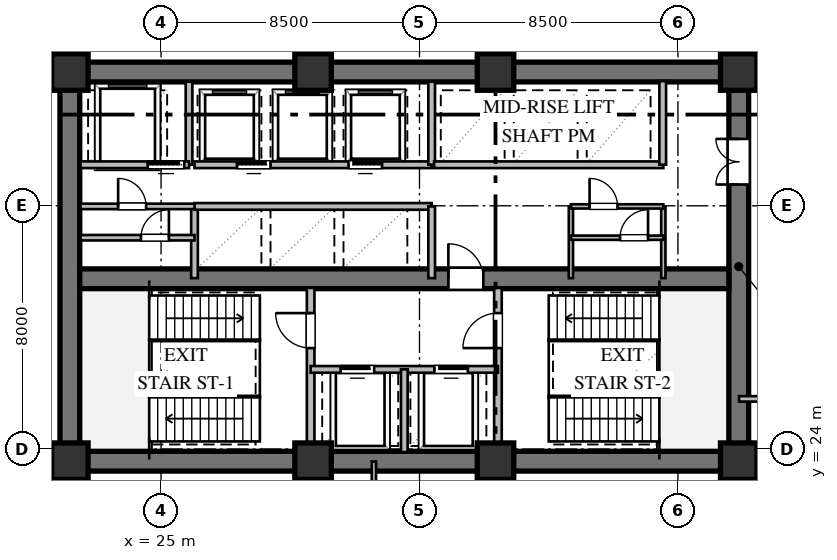
"""IFC4 building model, lengths in metres.
Left out: names, types, materials, properties, quantities, classifications, styles, units other than length and angle.
Written with IfcOpenShell. Run it as: python <this file> out.ifc"""

import sys

from ifc_helpers import new_model, si_unit, direction, frame, frame_2d, origin, origin_2d, place, context, subcontext, project, spatial, rectangle, extrude, element, fill, save


model = new_model("IFC4")
c1 = context("Model", 3, precision=1e-05, world=origin(), true_north=direction((0.0, 1.0)))
c2 = subcontext(c1, "Body", "Model", "MODEL_VIEW")
j1 = project(units=[si_unit("LENGTHUNIT", "METRE"), si_unit("PLANEANGLEUNIT", "RADIAN")], contexts=[c1])
p1 = place(None, origin())
s1 = spatial("IfcSite", under=j1, at=p1, CompositionType="ELEMENT")
p2 = place(p1, origin())
s2 = spatial("IfcBuilding", under=s1, at=p2, CompositionType="ELEMENT")
p3 = place(p2, frame((0.0, 0.0, 19.2)))
s3 = spatial("IfcBuildingStorey", under=s2, at=p3, CompositionType="ELEMENT", Elevation=19.2)
for number, where, z_axis, x_axis in (
    (1, (21.675, 23.6, 0.0), (0.0, 0.0, 1.0), (1.0, 0.0, 0.0)),
    (2, (21.675, 36.4, 0.0), (0.0, 0.0, 1.0), (1.0, 0.0, 0.0)),
):
    element("IfcWall", number, at=place(p3, frame(where, z_axis=z_axis, x_axis=x_axis)), inside=s3, PredefinedType="SHEAR", context=c2, shape_type="SweptSolid", body=[
        extrude(rectangle(XDim=22.65, YDim=0.65, at=frame_2d((11.325, 0.0))), origin(), (0.0, 0.0, 1.0), 4.56),
    ])
p4 = place(p3, frame((22.0, 23.925, 0.0), z_axis=(0.0, 0.0, 1.0), x_axis=(0.0, 1.0, 0.0)))
e3 = element("IfcWall", 3, at=p4, inside=s3, PredefinedType="SHEAR", context=c2, shape_type="SweptSolid", body=[
    extrude(rectangle(XDim=12.15, YDim=0.65, at=frame_2d((6.075, 0.0))), origin(), (0.0, 0.0, 1.0), 4.56),
])
p5 = place(p3, frame((44.0, 23.925, 0.0), z_axis=(0.0, 0.0, 1.0), x_axis=(0.0, 1.0, 0.0)))
e4 = element("IfcWall", 4, at=p5, inside=s3, PredefinedType="SHEAR", context=c2, shape_type="SweptSolid", body=[
    extrude(rectangle(XDim=12.15, YDim=0.65, at=frame_2d((6.075, 0.0))), origin(), (0.0, 0.0, 1.0), 4.56),
])
p6 = place(p5, frame((8.775, 0.0, 0.0)))
e5 = element("IfcOpeningElement", 5, at=p6, cuts=e4, PredefinedType="OPENING", context=c2, shape_type="SweptSolid", body=[
    extrude(rectangle(XDim=1.5, YDim=2.15, at=frame_2d((0.75, 1.075))), frame((0.0, 0.335, 0.0), z_axis=(0.0, -1.0, 0.0), x_axis=(1.0, 0.0, 0.0)), (0.0, 0.0, 1.0), 0.67),
])
p7 = place(p3, frame((22.325, 29.6, 0.0), z_axis=(0.0, 0.0, 1.0), x_axis=(1.0, 0.0, 0.0)))
e6 = element("IfcWall", 6, at=p7, inside=s3, PredefinedType="SHEAR", context=c2, shape_type="SweptSolid", body=[
    extrude(rectangle(XDim=21.35, YDim=0.65, at=frame_2d((10.675, 0.0))), origin(), (0.0, 0.0, 1.0), 4.56),
])
p8 = place(p7, frame((12.125, 0.0, 0.0)))
e7 = element("IfcOpeningElement", 7, at=p8, cuts=e6, PredefinedType="OPENING", context=c2, shape_type="SweptSolid", body=[
    extrude(rectangle(XDim=1.15, YDim=2.1, at=frame_2d((0.575, 1.05))), frame((0.0, 0.335, 0.0), z_axis=(0.0, -1.0, 0.0), x_axis=(1.0, 0.0, 0.0)), (0.0, 0.0, 1.0), 0.67),
])
for number, where, z_axis, x_axis in (
    (8, (22.0, 23.6, 0.0), (0.0, 0.0, 1.0), (1.0, 0.0, 0.0)),
    (9, (30.0, 23.6, 0.0), (0.0, 0.0, 1.0), (1.0, 0.0, 0.0)),
    (10, (36.0, 23.6, 0.0), (0.0, 0.0, 1.0), (1.0, 0.0, 0.0)),
    (11, (44.0, 23.6, 0.0), (0.0, 0.0, 1.0), (1.0, 0.0, 0.0)),
    (12, (44.0, 36.4, 0.0), (0.0, 0.0, 1.0), (1.0, 0.0, 0.0)),
    (13, (36.0, 36.4, 0.0), (0.0, 0.0, 1.0), (1.0, 0.0, 0.0)),
    (14, (30.0, 36.4, 0.0), (0.0, 0.0, 1.0), (1.0, 0.0, 0.0)),
    (15, (22.0, 36.4, 0.0), (0.0, 0.0, 1.0), (1.0, 0.0, 0.0)),
):
    element("IfcColumn", number, at=place(p3, frame(where, z_axis=z_axis, x_axis=x_axis)), inside=s3, PredefinedType="COLUMN", context=c2, shape_type="SweptSolid", body=[
        extrude(rectangle(XDim=1.2, YDim=1.2, at=origin_2d()), origin(), (0.0, 0.0, 1.0), 4.8),
    ])
p9 = place(p3, frame((29.92, 23.9, 0.0), z_axis=(0.0, 0.0, 1.0), x_axis=(0.0, 1.0, 0.0)))
e16 = element("IfcWall", 16, at=p9, inside=s3, PredefinedType="SOLIDWALL", context=c2, shape_type="SweptSolid", body=[
    extrude(rectangle(XDim=5.4, YDim=0.25, at=frame_2d((2.7, 0.0))), origin(), (0.0, 0.0, 1.0), 4.56),
])
p10 = place(p9, frame((3.421, 0.0, 0.0)))
e17 = element("IfcOpeningElement", 17, at=p10, cuts=e16, PredefinedType="OPENING", context=c2, shape_type="SweptSolid", body=[
    extrude(rectangle(XDim=1.15, YDim=2.1, at=frame_2d((0.575, 1.05))), frame((0.0, 0.135, 0.0), z_axis=(0.0, -1.0, 0.0), x_axis=(1.0, 0.0, 0.0)), (0.0, 0.0, 1.0), 0.27),
])
p11 = place(p3, frame((36.08, 23.9, 0.0), z_axis=(0.0, 0.0, 1.0), x_axis=(0.0, 1.0, 0.0)))
e18 = element("IfcWall", 18, at=p11, inside=s3, PredefinedType="SOLIDWALL", context=c2, shape_type="SweptSolid", body=[
    extrude(rectangle(XDim=5.4, YDim=0.25, at=frame_2d((2.7, 0.0))), origin(), (0.0, 0.0, 1.0), 4.56),
])
p12 = place(p11, frame((3.421, 0.0, 0.0)))
e19 = element("IfcOpeningElement", 19, at=p12, cuts=e18, PredefinedType="OPENING", context=c2, shape_type="SweptSolid", body=[
    extrude(rectangle(XDim=1.15, YDim=2.1, at=frame_2d((0.575, 1.05))), frame((0.0, 0.135, 0.0), z_axis=(0.0, -1.0, 0.0), x_axis=(1.0, 0.0, 0.0)), (0.0, 0.0, 1.0), 0.27),
])
p13 = place(p3, frame((29.92, 26.62, 0.0), z_axis=(0.0, 0.0, 1.0), x_axis=(1.0, 0.0, 0.0)))
e20 = element("IfcWall", 20, at=p13, inside=s3, PredefinedType="SOLIDWALL", context=c2, shape_type="SweptSolid", body=[
    extrude(rectangle(XDim=6.16, YDim=0.22, at=frame_2d((3.08, 0.0))), origin(), (0.0, 0.0, 1.0), 4.56),
])
p14 = place(p13, frame((0.99, 0.0, 0.0)))
e21 = element("IfcOpeningElement", 21, at=p14, cuts=e20, PredefinedType="OPENING", context=c2, shape_type="SweptSolid", body=[
    extrude(rectangle(XDim=1.1, YDim=2.1, at=frame_2d((0.55, 1.05))), frame((0.0, 0.12, 0.0), z_axis=(0.0, -1.0, 0.0), x_axis=(1.0, 0.0, 0.0)), (0.0, 0.0, 1.0), 0.24),
])
p15 = place(p13, frame((4.07, 0.0, 0.0)))
e22 = element("IfcOpeningElement", 22, at=p15, cuts=e20, PredefinedType="OPENING", context=c2, shape_type="SweptSolid", body=[
    extrude(rectangle(XDim=1.1, YDim=2.1, at=frame_2d((0.55, 1.05))), frame((0.0, 0.12, 0.0), z_axis=(0.0, -1.0, 0.0), x_axis=(1.0, 0.0, 0.0)), (0.0, 0.0, 1.0), 0.24),
])
p16 = place(p3, frame((33.0, 23.9, 0.0), z_axis=(0.0, 0.0, 1.0), x_axis=(0.0, 1.0, 0.0)))
e23 = element("IfcWall", 23, at=p16, inside=s3, PredefinedType="SOLIDWALL", context=c2, shape_type="SweptSolid", body=[
    extrude(rectangle(XDim=2.72, YDim=0.22, at=frame_2d((1.36, 0.0))), origin(), (0.0, 0.0, 1.0), 4.56),
])
p17 = place(p3, frame((25.92, 33.35, 0.0), z_axis=(0.0, 0.0, 1.0), x_axis=(0.0, 1.0, 0.0)))
e24 = element("IfcWall", 24, at=p17, inside=s3, PredefinedType="SOLIDWALL", context=c2, shape_type="SweptSolid", body=[
    extrude(rectangle(XDim=2.73, YDim=0.22, at=frame_2d((1.365, 0.0))), origin(), (0.0, 0.0, 1.0), 4.56),
])
p18 = place(p3, frame((22.35, 33.35, 0.0), z_axis=(0.0, 0.0, 1.0), x_axis=(1.0, 0.0, 0.0)))
e25 = element("IfcWall", 25, at=p18, inside=s3, PredefinedType="SOLIDWALL", context=c2, shape_type="SweptSolid", body=[
    extrude(rectangle(XDim=3.57, YDim=0.22, at=frame_2d((1.785, 0.0))), origin(), (0.0, 0.0, 1.0), 4.56),
])
p19 = place(p18, frame((2.213, 0.0, 0.0)))
e26 = element("IfcOpeningElement", 26, at=p19, cuts=e25, PredefinedType="OPENING", context=c2, shape_type="SweptSolid", body=[
    extrude(rectangle(XDim=1.2, YDim=2.1, at=frame_2d((0.6, 1.05))), frame((0.0, 0.12, 0.0), z_axis=(0.0, -1.0, 0.0), x_axis=(1.0, 0.0, 0.0)), (0.0, 0.0, 1.0), 0.24),
])
p20 = place(p3, frame((26.1, 29.62, 0.0), z_axis=(0.0, 0.0, 1.0), x_axis=(0.0, 1.0, 0.0)))
e27 = element("IfcWall", 27, at=p20, inside=s3, PredefinedType="SOLIDWALL", context=c2, shape_type="SweptSolid", body=[
    extrude(rectangle(XDim=2.36, YDim=0.22, at=frame_2d((1.18, 0.0))), origin(), (0.0, 0.0, 1.0), 4.56),
])
p21 = place(p3, frame((26.1, 31.98, 0.0), z_axis=(0.0, 0.0, 1.0), x_axis=(1.0, 0.0, 0.0)))
e28 = element("IfcWall", 28, at=p21, inside=s3, PredefinedType="SOLIDWALL", context=c2, shape_type="SweptSolid", body=[
    extrude(rectangle(XDim=7.8, YDim=0.22, at=frame_2d((3.9, 0.0))), origin(), (0.0, 0.0, 1.0), 4.56),
])
p22 = place(p3, frame((33.9, 29.62, 0.0), z_axis=(0.0, 0.0, 1.0), x_axis=(0.0, 1.0, 0.0)))
e29 = element("IfcWall", 29, at=p22, inside=s3, PredefinedType="SOLIDWALL", context=c2, shape_type="SweptSolid", body=[
    extrude(rectangle(XDim=2.36, YDim=0.22, at=frame_2d((1.18, 0.0))), origin(), (0.0, 0.0, 1.0), 4.56),
])
p23 = place(p3, frame((26.1, 33.35, 0.0), z_axis=(0.0, 0.0, 1.0), x_axis=(1.0, 0.0, 0.0)))
e30 = element("IfcWall", 30, at=p23, inside=s3, PredefinedType="SOLIDWALL", context=c2, shape_type="SweptSolid", body=[
    extrude(rectangle(XDim=7.8, YDim=0.22, at=frame_2d((3.9, 0.0))), origin(), (0.0, 0.0, 1.0), 4.56),
])
p24 = place(p23, frame((1.4, 0.0, 0.0)))
e31 = element("IfcOpeningElement", 31, at=p24, cuts=e30, PredefinedType="OPENING", context=c2, shape_type="SweptSolid", body=[
    extrude(rectangle(XDim=1.1, YDim=2.1, at=frame_2d((0.55, 1.05))), frame((0.0, 0.12, 0.0), z_axis=(0.0, -1.0, 0.0), x_axis=(1.0, 0.0, 0.0)), (0.0, 0.0, 1.0), 0.24),
])
p25 = place(p23, frame((5.066, 0.0, 0.0)))
e32 = element("IfcOpeningElement", 32, at=p25, cuts=e30, PredefinedType="OPENING", context=c2, shape_type="SweptSolid", body=[
    extrude(rectangle(XDim=1.1, YDim=2.1, at=frame_2d((0.55, 1.05))), frame((0.0, 0.12, 0.0), z_axis=(0.0, -1.0, 0.0), x_axis=(1.0, 0.0, 0.0)), (0.0, 0.0, 1.0), 0.24),
])
p26 = place(p3, frame((33.9, 33.35, 0.0), z_axis=(0.0, 0.0, 1.0), x_axis=(0.0, 1.0, 0.0)))
e33 = element("IfcWall", 33, at=p26, inside=s3, PredefinedType="SOLIDWALL", context=c2, shape_type="SweptSolid", body=[
    extrude(rectangle(XDim=2.73, YDim=0.22, at=frame_2d((1.365, 0.0))), origin(), (0.0, 0.0, 1.0), 4.56),
])
p27 = place(p3, frame((33.98, 33.35, 0.0), z_axis=(0.0, 0.0, 1.0), x_axis=(1.0, 0.0, 0.0)))
e34 = element("IfcWall", 34, at=p27, inside=s3, PredefinedType="SOLIDWALL", context=c2, shape_type="SweptSolid", body=[
    extrude(rectangle(XDim=7.54, YDim=0.22, at=frame_2d((3.77, 0.0))), origin(), (0.0, 0.0, 1.0), 4.56),
])
p28 = place(p3, frame((41.5, 33.35, 0.0), z_axis=(0.0, 0.0, 1.0), x_axis=(0.0, 1.0, 0.0)))
e35 = element("IfcWall", 35, at=p28, inside=s3, PredefinedType="SOLIDWALL", context=c2, shape_type="SweptSolid", body=[
    extrude(rectangle(XDim=2.75, YDim=0.22, at=frame_2d((1.375, 0.0))), origin(), (0.0, 0.0, 1.0), 4.56),
])
p29 = place(p3, frame((22.35, 30.95, 0.0), z_axis=(0.0, 0.0, 1.0), x_axis=(1.0, 0.0, 0.0)))
e36 = element("IfcWall", 36, at=p29, inside=s3, PredefinedType="PARTITIONING", context=c2, shape_type="SweptSolid", body=[
    extrude(rectangle(XDim=3.75, YDim=0.18, at=frame_2d((1.875, 0.0))), origin(), (0.0, 0.0, 1.0), 4.56),
])
p30 = place(p29, frame((1.988, 0.0, 0.0)))
e37 = element("IfcOpeningElement", 37, at=p30, cuts=e36, PredefinedType="OPENING", context=c2, shape_type="SweptSolid", body=[
    extrude(rectangle(XDim=0.92, YDim=2.1, at=frame_2d((0.46, 1.05))), frame((0.0, 0.1, 0.0), z_axis=(0.0, -1.0, 0.0), x_axis=(1.0, 0.0, 0.0)), (0.0, 0.0, 1.0), 0.2),
])
p31 = place(p3, frame((22.35, 31.98, 0.0), z_axis=(0.0, 0.0, 1.0), x_axis=(1.0, 0.0, 0.0)))
e38 = element("IfcWall", 38, at=p31, inside=s3, PredefinedType="PARTITIONING", context=c2, shape_type="SweptSolid", body=[
    extrude(rectangle(XDim=3.75, YDim=0.18, at=frame_2d((1.875, 0.0))), origin(), (0.0, 0.0, 1.0), 4.56),
])
p32 = place(p31, frame((1.238, 0.0, 0.0)))
e39 = element("IfcOpeningElement", 39, at=p32, cuts=e38, PredefinedType="OPENING", context=c2, shape_type="SweptSolid", body=[
    extrude(rectangle(XDim=0.92, YDim=2.1, at=frame_2d((0.46, 1.05))), frame((0.0, 0.1, 0.0), z_axis=(0.0, -1.0, 0.0), x_axis=(1.0, 0.0, 0.0)), (0.0, 0.0, 1.0), 0.2),
])
p33 = place(p3, frame((38.48, 29.62, 0.0), z_axis=(0.0, 0.0, 1.0), x_axis=(0.0, 1.0, 0.0)))
e40 = element("IfcWall", 40, at=p33, inside=s3, PredefinedType="PARTITIONING", context=c2, shape_type="SweptSolid", body=[
    extrude(rectangle(XDim=2.36, YDim=0.14, at=frame_2d((1.18, 0.0))), origin(), (0.0, 0.0, 1.0), 4.56),
])
p34 = place(p3, frame((41.52, 29.62, 0.0), z_axis=(0.0, 0.0, 1.0), x_axis=(0.0, 1.0, 0.0)))
e41 = element("IfcWall", 41, at=p34, inside=s3, PredefinedType="PARTITIONING", context=c2, shape_type="SweptSolid", body=[
    extrude(rectangle(XDim=2.36, YDim=0.14, at=frame_2d((1.18, 0.0))), origin(), (0.0, 0.0, 1.0), 1.887),
])
p35 = place(p3, frame((38.48, 30.95, 0.0), z_axis=(0.0, 0.0, 1.0), x_axis=(1.0, 0.0, 0.0)))
e42 = element("IfcWall", 42, at=p35, inside=s3, PredefinedType="PARTITIONING", context=c2, shape_type="SweptSolid", body=[
    extrude(rectangle(XDim=3.04, YDim=0.14, at=frame_2d((1.52, 0.0))), origin(), (0.0, 0.0, 1.0), 4.56),
])
p36 = place(p35, frame((1.617, 0.0, 0.0)))
e43 = element("IfcOpeningElement", 43, at=p36, cuts=e42, PredefinedType="OPENING", context=c2, shape_type="SweptSolid", body=[
    extrude(rectangle(XDim=0.92, YDim=2.1, at=frame_2d((0.46, 1.05))), frame((0.0, 0.08, 0.0), z_axis=(0.0, -1.0, 0.0), x_axis=(1.0, 0.0, 0.0)), (0.0, 0.0, 1.0), 0.16),
])
p37 = place(p3, frame((38.48, 31.98, 0.0), z_axis=(0.0, 0.0, 1.0), x_axis=(1.0, 0.0, 0.0)))
e44 = element("IfcWall", 44, at=p37, inside=s3, PredefinedType="PARTITIONING", context=c2, shape_type="SweptSolid", body=[
    extrude(rectangle(XDim=3.04, YDim=0.14, at=frame_2d((1.52, 0.0))), origin(), (0.0, 0.0, 1.0), 4.56),
])
p38 = place(p37, frame((0.614, 0.0, 0.0)))
e45 = element("IfcOpeningElement", 45, at=p38, cuts=e44, PredefinedType="OPENING", context=c2, shape_type="SweptSolid", body=[
    extrude(rectangle(XDim=0.92, YDim=2.1, at=frame_2d((0.46, 1.05))), frame((0.0, 0.08, 0.0), z_axis=(0.0, -1.0, 0.0), x_axis=(1.0, 0.0, 0.0)), (0.0, 0.0, 1.0), 0.16),
])
p39 = place(p3, frame((62.415, 25.65, 0.0), z_axis=(0.0, 0.0, 1.0), x_axis=(-1.0, 0.0, 0.0)))
e46 = element("IfcWall", 46, at=p39, inside=s3, PredefinedType="PARTITIONING", context=c2, shape_type="SweptSolid", body=[
    extrude(rectangle(XDim=18.405, YDim=0.18, at=frame_2d((9.203, 0.0))), origin(), (0.0, 0.0, 1.0), 4.006),
])
p40 = place(p39, frame((8.46, 0.0, 0.0)))
e47 = element("IfcOpeningElement", 47, at=p40, cuts=e46, PredefinedType="OPENING", context=c2, shape_type="SweptSolid", body=[
    extrude(rectangle(XDim=1.2, YDim=2.15, at=frame_2d((0.6, 1.075))), frame((0.0, 0.1, 0.0), z_axis=(0.0, -1.0, 0.0), x_axis=(1.0, 0.0, 0.0)), (0.0, 0.0, 1.0), 0.2),
])
p41 = place(p3, frame((21.675, 23.59, 0.0), z_axis=(0.0, 0.0, 1.0), x_axis=(0.0, -1.0, 0.0)))
e48 = element("IfcWall", 48, at=p41, inside=s3, PredefinedType="PARTITIONING", context=c2, shape_type="SweptSolid", body=[
    extrude(rectangle(XDim=3.62, YDim=0.18, at=frame_2d((1.81, 0.0))), origin(), (0.0, 0.0, 1.0), 3.7),
])
p42 = place(p3, frame((44.325, 5.272, 0.0), z_axis=(0.0, 0.0, 1.0), x_axis=(0.0, 1.0, 0.0)))
e49 = element("IfcWall", 49, at=p42, inside=s3, PredefinedType="PARTITIONING", context=c2, shape_type="SweptSolid", body=[
    extrude(rectangle(XDim=18.318, YDim=0.14, at=frame_2d((9.159, 0.0))), origin(), (0.0, 0.0, 1.0), 3.7),
])
p43 = place(p42, frame((8.349, 0.0, 0.0)))
e50 = element("IfcOpeningElement", 50, at=p43, cuts=e49, PredefinedType="OPENING", context=c2, shape_type="SweptSolid", body=[
    extrude(rectangle(XDim=1.2, YDim=2.15, at=frame_2d((0.6, 1.075))), frame((0.0, 0.08, 0.0), z_axis=(0.0, -1.0, 0.0), x_axis=(1.0, 0.0, 0.0)), (0.0, 0.0, 1.0), 0.16),
])
p44 = place(p3, frame((32.0, 23.59, 0.0), z_axis=(0.0, 0.0, 1.0), x_axis=(0.0, -1.0, 0.0)))
e51 = element("IfcWall", 51, at=p44, inside=s3, PredefinedType="PARTITIONING", context=c2, shape_type="SweptSolid", body=[
    extrude(rectangle(XDim=16.944, YDim=0.14, at=frame_2d((8.472, 0.0))), origin(), (0.0, 0.0, 1.0), 4.56),
])
p45 = place(p10, origin())
e52 = element("IfcDoor", 52, at=p45, inside=s3, OperationType="SINGLE_SWING_RIGHT", PredefinedType="DOOR", context=c2, shape_type="SweptSolid", body=[
    extrude(rectangle(XDim=1.15, YDim=2.1, at=frame_2d((0.575, 1.05))), frame((0.0, 0.025, 0.0), z_axis=(0.0, -1.0, 0.0), x_axis=(1.0, 0.0, 0.0)), (0.0, 0.0, 1.0), 0.05),
])
fill(e17, e52)
p46 = place(p12, origin())
e53 = element("IfcDoor", 53, at=p46, inside=s3, OperationType="SINGLE_SWING_LEFT", PredefinedType="DOOR", context=c2, shape_type="SweptSolid", body=[
    extrude(rectangle(XDim=1.15, YDim=2.1, at=frame_2d((0.575, 1.05))), frame((0.0, 0.025, 0.0), z_axis=(0.0, -1.0, 0.0), x_axis=(1.0, 0.0, 0.0)), (0.0, 0.0, 1.0), 0.05),
])
fill(e19, e53)
p47 = place(p14, origin())
e54 = element("IfcDoor", 54, at=p47, inside=s3, OperationType="SLIDING_TO_LEFT", PredefinedType="DOOR", context=c2, shape_type="SweptSolid", body=[
    extrude(rectangle(XDim=1.1, YDim=2.1, at=frame_2d((0.55, 1.05))), frame((0.0, 0.025, 0.0), z_axis=(0.0, -1.0, 0.0), x_axis=(1.0, 0.0, 0.0)), (0.0, 0.0, 1.0), 0.05),
])
fill(e21, e54)
p48 = place(p15, origin())
e55 = element("IfcDoor", 55, at=p48, inside=s3, OperationType="SLIDING_TO_RIGHT", PredefinedType="DOOR", context=c2, shape_type="SweptSolid", body=[
    extrude(rectangle(XDim=1.1, YDim=2.1, at=frame_2d((0.55, 1.05))), frame((0.0, 0.025, 0.0), z_axis=(0.0, -1.0, 0.0), x_axis=(1.0, 0.0, 0.0)), (0.0, 0.0, 1.0), 0.05),
])
fill(e22, e55)
p49 = place(p8, origin())
e56 = element("IfcDoor", 56, at=p49, inside=s3, OperationType="SINGLE_SWING_LEFT", PredefinedType="DOOR", context=c2, shape_type="SweptSolid", body=[
    extrude(rectangle(XDim=1.15, YDim=2.1, at=frame_2d((0.575, 1.05))), frame((0.0, 0.025, 0.0), z_axis=(0.0, -1.0, 0.0), x_axis=(1.0, 0.0, 0.0)), (0.0, 0.0, 1.0), 0.05),
])
fill(e7, e56)
p50 = place(p6, origin())
e57 = element("IfcDoor", 57, at=p50, inside=s3, OperationType="DOUBLE_DOOR_SINGLE_SWING", PredefinedType="DOOR", context=c2, shape_type="SweptSolid", body=[
    extrude(rectangle(XDim=1.5, YDim=2.15, at=frame_2d((0.75, 1.075))), frame((0.0, 0.025, 0.0), z_axis=(0.0, -1.0, 0.0), x_axis=(1.0, 0.0, 0.0)), (0.0, 0.0, 1.0), 0.05),
])
fill(e5, e57)
p51 = place(p19, origin())
e58 = element("IfcDoor", 58, at=p51, inside=s3, OperationType="SLIDING_TO_LEFT", PredefinedType="DOOR", context=c2, shape_type="SweptSolid", body=[
    extrude(rectangle(XDim=1.2, YDim=2.1, at=frame_2d((0.6, 1.05))), frame((0.0, 0.025, 0.0), z_axis=(0.0, -1.0, 0.0), x_axis=(1.0, 0.0, 0.0)), (0.0, 0.0, 1.0), 0.05),
])
fill(e26, e58)
p52 = place(p24, origin())
e59 = element("IfcDoor", 59, at=p52, inside=s3, OperationType="SLIDING_TO_LEFT", PredefinedType="DOOR", context=c2, shape_type="SweptSolid", body=[
    extrude(rectangle(XDim=1.1, YDim=2.1, at=frame_2d((0.55, 1.05))), frame((0.0, 0.025, 0.0), z_axis=(0.0, -1.0, 0.0), x_axis=(1.0, 0.0, 0.0)), (0.0, 0.0, 1.0), 0.05),
])
fill(e31, e59)
p53 = place(p25, origin())
e60 = element("IfcDoor", 60, at=p53, inside=s3, OperationType="SLIDING_TO_RIGHT", PredefinedType="DOOR", context=c2, shape_type="SweptSolid", body=[
    extrude(rectangle(XDim=1.1, YDim=2.1, at=frame_2d((0.55, 1.05))), frame((0.0, 0.025, 0.0), z_axis=(0.0, -1.0, 0.0), x_axis=(1.0, 0.0, 0.0)), (0.0, 0.0, 1.0), 0.05),
])
fill(e32, e60)
p54 = place(p32, origin())
e61 = element("IfcDoor", 61, at=p54, inside=s3, OperationType="SINGLE_SWING_LEFT", PredefinedType="DOOR", context=c2, shape_type="SweptSolid", body=[
    extrude(rectangle(XDim=0.92, YDim=2.1, at=frame_2d((0.46, 1.05))), frame((0.0, 0.025, 0.0), z_axis=(0.0, -1.0, 0.0), x_axis=(1.0, 0.0, 0.0)), (0.0, 0.0, 1.0), 0.05),
])
fill(e39, e61)
p55 = place(p30, origin())
e62 = element("IfcDoor", 62, at=p55, inside=s3, OperationType="SINGLE_SWING_RIGHT", PredefinedType="DOOR", context=c2, shape_type="SweptSolid", body=[
    extrude(rectangle(XDim=0.92, YDim=2.1, at=frame_2d((0.46, 1.05))), frame((0.0, 0.025, 0.0), z_axis=(0.0, -1.0, 0.0), x_axis=(1.0, 0.0, 0.0)), (0.0, 0.0, 1.0), 0.05),
])
fill(e37, e62)
p56 = place(p38, origin())
e63 = element("IfcDoor", 63, at=p56, inside=s3, OperationType="SINGLE_SWING_LEFT", PredefinedType="DOOR", context=c2, shape_type="SweptSolid", body=[
    extrude(rectangle(XDim=0.92, YDim=2.1, at=frame_2d((0.46, 1.05))), frame((0.0, 0.025, 0.0), z_axis=(0.0, -1.0, 0.0), x_axis=(1.0, 0.0, 0.0)), (0.0, 0.0, 1.0), 0.05),
])
fill(e45, e63)
p57 = place(p36, origin())
e64 = element("IfcDoor", 64, at=p57, inside=s3, OperationType="SINGLE_SWING_RIGHT", PredefinedType="DOOR", context=c2, shape_type="SweptSolid", body=[
    extrude(rectangle(XDim=0.92, YDim=2.1, at=frame_2d((0.46, 1.05))), frame((0.0, 0.025, 0.0), z_axis=(0.0, -1.0, 0.0), x_axis=(1.0, 0.0, 0.0)), (0.0, 0.0, 1.0), 0.05),
])
fill(e43, e64)
save(model, sys.argv[1])
